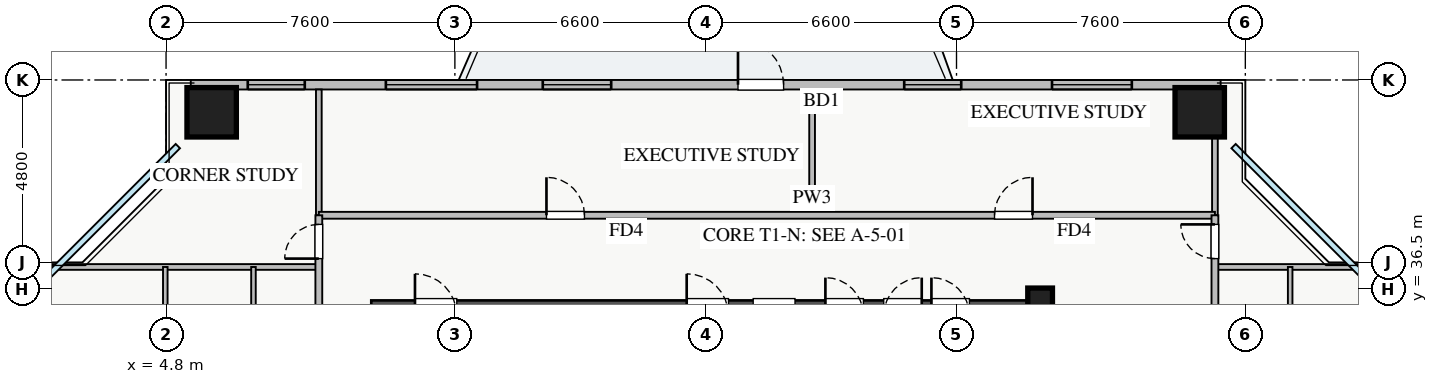
"""IFC4 building model, lengths in metres.
Left out: names, types, materials, properties, quantities, classifications, styles, units other than length and angle.
Written with IfcOpenShell. Run it as: python <this file> out.ifc"""

import sys

from ifc_helpers import new_model, si_unit, direction, frame, frame_2d, origin, origin_2d, place, context, subcontext, project, spatial, rectangle, extrude, source, transform, mapped, element, fill, save


model = new_model("IFC4")
c1 = context("Model", 3, precision=1e-05, world=origin(), true_north=direction((0.0, 1.0)))
c2 = subcontext(c1, "Body", "Model", "MODEL_VIEW")
j1 = project(units=[si_unit("LENGTHUNIT", "METRE"), si_unit("PLANEANGLEUNIT", "RADIAN")], contexts=[c1])
p1 = place(None, origin())
s1 = spatial("IfcSite", under=j1, at=p1, CompositionType="ELEMENT")
p2 = place(p1, origin())
s2 = spatial("IfcBuilding", under=s1, at=p2, CompositionType="ELEMENT")
p3 = place(p2, frame((0.0, 0.0, 53.5)))
s3 = spatial("IfcBuildingStorey", under=s2, at=p3, CompositionType="ELEMENT", Elevation=53.5)
p4 = place(p3, frame((10.2, 35.8, 0.0), z_axis=(0.0, 0.0, 1.0), x_axis=(1.0, 0.0, 0.0)))
e1 = element("IfcWall", 1, at=p4, inside=s3, PredefinedType="SHEAR", context=c2, shape_type="SweptSolid", body=[
    extrude(rectangle(XDim=17.6, YDim=0.8, at=frame_2d((8.8, 0.0))), origin(), (0.0, 0.0, 1.0), 3.25),
])
p5 = place(p4, frame((1.15, 0.0, 0.0)))
e2 = element("IfcOpeningElement", 2, at=p5, cuts=e1, PredefinedType="OPENING", context=c2, shape_type="SweptSolid", body=[
    extrude(rectangle(XDim=1.1, YDim=2.05, at=frame_2d((0.55, 1.025))), frame((0.0, 0.41, 0.0), z_axis=(0.0, -1.0, 0.0), x_axis=(1.0, 0.0, 0.0)), (0.0, 0.0, 1.0), 0.82),
])
p6 = place(p4, frame((8.3, 0.0, 0.0)))
e3 = element("IfcOpeningElement", 3, at=p6, cuts=e1, PredefinedType="OPENING", context=c2, shape_type="SweptSolid", body=[
    extrude(rectangle(XDim=1.1, YDim=2.05, at=frame_2d((0.55, 1.025))), frame((0.0, 0.41, 0.0), z_axis=(0.0, -1.0, 0.0), x_axis=(1.0, 0.0, 0.0)), (0.0, 0.0, 1.0), 0.82),
])
p7 = place(p4, frame((10.05, 0.0, 0.0)))
e4 = element("IfcOpeningElement", 4, at=p7, cuts=e1, PredefinedType="OPENING", context=c2, shape_type="SweptSolid", body=[
    extrude(rectangle(XDim=1.1, YDim=2.05, at=frame_2d((0.55, 1.025))), frame((0.0, 0.41, 0.0), z_axis=(0.0, -1.0, 0.0), x_axis=(1.0, 0.0, 0.0)), (0.0, 0.0, 1.0), 0.82),
])
p8 = place(p4, frame((14.74, 0.0, 0.0)))
e5 = element("IfcOpeningElement", 5, at=p8, cuts=e1, PredefinedType="OPENING", context=c2, shape_type="SweptSolid", body=[
    extrude(rectangle(XDim=1.0, YDim=2.05, at=frame_2d((0.5, 1.025))), frame((0.0, 0.41, 0.0), z_axis=(0.0, -1.0, 0.0), x_axis=(1.0, 0.0, 0.0)), (0.0, 0.0, 1.0), 0.82),
])
p9 = place(p4, frame((11.95, 0.0, 0.0)))
e6 = element("IfcOpeningElement", 6, at=p9, cuts=e1, PredefinedType="OPENING", context=c2, shape_type="SweptSolid", body=[
    extrude(rectangle(XDim=1.0, YDim=2.05, at=frame_2d((0.5, 1.025))), frame((0.0, 0.41, 0.0), z_axis=(0.0, -1.0, 0.0), x_axis=(1.0, 0.0, 0.0)), (0.0, 0.0, 1.0), 0.82),
])
p10 = place(p4, frame((13.485, 0.0, 0.0)))
e7 = element("IfcOpeningElement", 7, at=p10, cuts=e1, PredefinedType="OPENING", context=c2, shape_type="SweptSolid", body=[
    extrude(rectangle(XDim=1.0, YDim=2.05, at=frame_2d((0.5, 1.025))), frame((0.0, 0.41, 0.0), z_axis=(0.0, -1.0, 0.0), x_axis=(1.0, 0.0, 0.0)), (0.0, 0.0, 1.0), 0.82),
])
m1 = source(origin(), c2, "Body", "SweptSolid", [
    extrude(rectangle(XDim=0.65, YDim=0.65, at=origin_2d()), origin(), (0.0, 0.0, 1.0), 3.25),
])
p11 = place(p3, frame((27.8, 36.2, 0.0), z_axis=(0.0, 0.0, 1.0), x_axis=(1.0, 0.0, 0.0)))
e8 = element("IfcColumn", 8, at=p11, inside=s3, PredefinedType="PILASTER", context=c2, shape_type="MappedRepresentation", body=[
    mapped(m1, transform((0.0, 0.0, 0.0), x_axis=(1.0, 0.0, 0.0), y_axis=(0.0, 1.0, 0.0), z_axis=(0.0, 0.0, 1.0), scale=1.0)),
])
m2 = source(origin(), c2, "Body", "SweptSolid", [
    extrude(rectangle(XDim=1.3, YDim=1.3, at=origin_2d()), origin(), (0.0, 0.0, 1.0), 3.25),
])
for number, where, z_axis, x_axis in (
    (9, (32.0, 41.15, 0.0), (0.0, 0.0, 1.0), (1.0, 0.0, 0.0)),
    (10, (6.0, 41.15, 0.0), (0.0, 0.0, 1.0), (1.0, 0.0, 0.0)),
):
    element("IfcColumn", number, at=place(p3, frame(where, z_axis=z_axis, x_axis=x_axis)), inside=s3, PredefinedType="COLUMN", context=c2, shape_type="MappedRepresentation", body=[
        mapped(m2, transform((0.0, 0.0, 0.0), x_axis=(1.0, 0.0, 0.0), y_axis=(0.0, 1.0, 0.0), z_axis=(0.0, 0.0, 1.0), scale=1.0)),
    ])
p12 = place(p3, frame((5.45, 41.875, 0.0), z_axis=(0.0, 0.0, 1.0), x_axis=(1.0, 0.0, 0.0)))
e11 = element("IfcWall", 11, at=p12, inside=s3, PredefinedType="STANDARD", context=c2, shape_type="SweptSolid", body=[
    extrude(rectangle(XDim=27.1, YDim=0.25, at=frame_2d((13.55, 0.0))), origin(), (0.0, 0.0, 1.0), 2.61),
])
p13 = place(p12, frame((14.4, 0.0, 0.0)))
e12 = element("IfcOpeningElement", 12, at=p13, cuts=e11, PredefinedType="OPENING", context=c2, shape_type="SweptSolid", body=[
    extrude(rectangle(XDim=1.2, YDim=2.1, at=frame_2d((0.6, 1.05))), frame((0.0, 0.135, 0.0), z_axis=(0.0, -1.0, 0.0), x_axis=(1.0, 0.0, 0.0)), (0.0, 0.0, 1.0), 0.27),
])
p14 = place(p12, frame((1.5, 0.0, 0.9)))
e13 = element("IfcOpeningElement", 13, at=p14, cuts=e11, PredefinedType="OPENING", context=c2, shape_type="SweptSolid", body=[
    extrude(rectangle(XDim=1.5, YDim=1.5, at=frame_2d((0.75, 0.75))), frame((0.0, 0.135, 0.0), z_axis=(0.0, -1.0, 0.0), x_axis=(1.0, 0.0, 0.0)), (0.0, 0.0, 1.0), 0.27),
])
p15 = place(p12, frame((9.263, 0.0, 0.9)))
e14 = element("IfcOpeningElement", 14, at=p15, cuts=e11, PredefinedType="OPENING", context=c2, shape_type="SweptSolid", body=[
    extrude(rectangle(XDim=1.8, YDim=1.45, at=frame_2d((0.9, 0.725))), frame((0.0, 0.135, 0.0), z_axis=(0.0, -1.0, 0.0), x_axis=(1.0, 0.0, 0.0)), (0.0, 0.0, 1.0), 0.27),
])
p16 = place(p12, frame((18.774, 0.0, 0.9)))
e15 = element("IfcOpeningElement", 15, at=p16, cuts=e11, PredefinedType="OPENING", context=c2, shape_type="SweptSolid", body=[
    extrude(rectangle(XDim=1.5, YDim=1.5, at=frame_2d((0.75, 0.75))), frame((0.0, 0.135, 0.0), z_axis=(0.0, -1.0, 0.0), x_axis=(1.0, 0.0, 0.0)), (0.0, 0.0, 1.0), 0.27),
])
p17 = place(p12, frame((22.663, 0.0, 0.9)))
e16 = element("IfcOpeningElement", 16, at=p17, cuts=e11, PredefinedType="OPENING", context=c2, shape_type="SweptSolid", body=[
    extrude(rectangle(XDim=2.1, YDim=1.48, at=frame_2d((1.05, 0.74))), frame((0.0, 0.135, 0.0), z_axis=(0.0, -1.0, 0.0), x_axis=(1.0, 0.0, 0.0)), (0.0, 0.0, 1.0), 0.27),
])
p18 = place(p12, frame((5.134, 0.0, 0.9)))
e17 = element("IfcOpeningElement", 17, at=p18, cuts=e11, PredefinedType="OPENING", context=c2, shape_type="SweptSolid", body=[
    extrude(rectangle(XDim=2.4, YDim=1.5, at=frame_2d((1.2, 0.75))), frame((0.0, 0.135, 0.0), z_axis=(0.0, -1.0, 0.0), x_axis=(1.0, 0.0, 0.0)), (0.0, 0.0, 1.0), 0.27),
])
for number, where, z_axis, x_axis in (
    (18, (21.8, 38.44, 0.0), (0.0, 0.0, 1.0), (0.0, 1.0, 0.0)),
    (19, (8.82, 38.44, 0.0), (0.0, 0.0, 1.0), (0.0, 1.0, 0.0)),
    (20, (32.4, 38.44, 0.0), (0.0, 0.0, 1.0), (0.0, 1.0, 0.0)),
):
    element("IfcWall", number, at=place(p3, frame(where, z_axis=z_axis, x_axis=x_axis)), inside=s3, PredefinedType="PARTITIONING", context=c2, shape_type="SweptSolid", body=[
        extrude(rectangle(XDim=3.31, YDim=0.15, at=frame_2d((1.655, 0.0))), origin(), (0.0, 0.0, 1.0), 3.07),
    ])
p19 = place(p3, frame((8.82, 38.44, 0.0), z_axis=(0.0, 0.0, 1.0), x_axis=(1.0, 0.0, 0.0)))
e21 = element("IfcWall", 21, at=p19, inside=s3, PredefinedType="PARTITIONING", context=c2, shape_type="SweptSolid", body=[
    extrude(rectangle(XDim=23.58, YDim=0.18, at=frame_2d((11.79, 0.0))), origin(), (0.0, 0.0, 1.0), 3.07),
])
p20 = place(p19, frame((5.99, 0.0, 0.0)))
e22 = element("IfcOpeningElement", 22, at=p20, cuts=e21, PredefinedType="OPENING", context=c2, shape_type="SweptSolid", body=[
    extrude(rectangle(XDim=1.0, YDim=2.05, at=frame_2d((0.5, 1.025))), frame((0.0, 0.1, 0.0), z_axis=(0.0, -1.0, 0.0), x_axis=(1.0, 0.0, 0.0)), (0.0, 0.0, 1.0), 0.2),
])
p21 = place(p19, frame((17.78, 0.0, 0.0)))
e23 = element("IfcOpeningElement", 23, at=p21, cuts=e21, PredefinedType="OPENING", context=c2, shape_type="SweptSolid", body=[
    extrude(rectangle(XDim=1.0, YDim=2.05, at=frame_2d((0.5, 1.025))), frame((0.0, 0.1, 0.0), z_axis=(0.0, -1.0, 0.0), x_axis=(1.0, 0.0, 0.0)), (0.0, 0.0, 1.0), 0.2),
])
p22 = place(p3, frame((0.25, 37.08, 0.0), z_axis=(0.0, 0.0, 1.0), x_axis=(1.0, 0.0, 0.0)))
e24 = element("IfcWall", 24, at=p22, inside=s3, PredefinedType="PARTITIONING", context=c2, shape_type="SweptSolid", body=[
    extrude(rectangle(XDim=8.57, YDim=0.15, at=frame_2d((4.285, 0.0))), origin(), (0.0, 0.0, 1.0), 3.07),
])
for number, where, z_axis, x_axis in (
    (25, (4.78, 32.14, 0.0), (0.0, 0.0, 1.0), (0.0, 1.0, 0.0)),
    (26, (7.1, 32.14, 0.0), (0.0, 0.0, 1.0), (0.0, 1.0, 0.0)),
):
    element("IfcWall", number, at=place(p3, frame(where, z_axis=z_axis, x_axis=x_axis)), inside=s3, PredefinedType="PLUMBINGWALL", context=c2, shape_type="SweptSolid", body=[
        extrude(rectangle(XDim=4.94, YDim=0.12, at=frame_2d((2.47, 0.0))), origin(), (0.0, 0.0, 1.0), 3.07),
    ])
p23 = place(p3, frame((8.82, 7.21, 0.0), z_axis=(0.0, 0.0, 1.0), x_axis=(0.0, 1.0, 0.0)))
e27 = element("IfcWall", 27, at=p23, inside=s3, PredefinedType="PARTITIONING", context=c2, shape_type="SweptSolid", body=[
    extrude(rectangle(XDim=31.23, YDim=0.18, at=frame_2d((15.615, 0.0))), origin(), (0.0, 0.0, 1.0), 3.07),
])
p24 = place(p23, frame((30.09, 0.0, 0.0)))
e28 = element("IfcOpeningElement", 28, at=p24, cuts=e27, PredefinedType="OPENING", context=c2, shape_type="SweptSolid", body=[
    extrude(rectangle(XDim=0.9, YDim=2.05, at=frame_2d((0.45, 1.025))), frame((0.0, 0.1, 0.0), z_axis=(0.0, -1.0, 0.0), x_axis=(1.0, 0.0, 0.0)), (0.0, 0.0, 1.0), 0.2),
])
p25 = place(p23, frame((0.24, 0.0, 0.0)))
e29 = element("IfcOpeningElement", 29, at=p25, cuts=e27, PredefinedType="OPENING", context=c2, shape_type="SweptSolid", body=[
    extrude(rectangle(XDim=0.9, YDim=2.05, at=frame_2d((0.45, 1.025))), frame((0.0, 0.1, 0.0), z_axis=(0.0, -1.0, 0.0), x_axis=(1.0, 0.0, 0.0)), (0.0, 0.0, 1.0), 0.2),
])
p26 = place(p23, frame((2.95, 0.0, 0.0)))
e30 = element("IfcOpeningElement", 30, at=p26, cuts=e27, PredefinedType="OPENING", context=c2, shape_type="SweptSolid", body=[
    extrude(rectangle(XDim=1.0, YDim=2.05, at=frame_2d((0.5, 1.025))), frame((0.0, 0.1, 0.0), z_axis=(0.0, -1.0, 0.0), x_axis=(1.0, 0.0, 0.0)), (0.0, 0.0, 1.0), 0.2),
])
p27 = place(p23, frame((15.115, 0.0, 0.0)))
e31 = element("IfcOpeningElement", 31, at=p27, cuts=e27, PredefinedType="OPENING", context=c2, shape_type="SweptSolid", body=[
    extrude(rectangle(XDim=1.0, YDim=2.05, at=frame_2d((0.5, 1.025))), frame((0.0, 0.1, 0.0), z_axis=(0.0, -1.0, 0.0), x_axis=(1.0, 0.0, 0.0)), (0.0, 0.0, 1.0), 0.2),
])
p28 = place(p23, frame((21.96, 0.0, 0.0)))
e32 = element("IfcOpeningElement", 32, at=p28, cuts=e27, PredefinedType="OPENING", context=c2, shape_type="SweptSolid", body=[
    extrude(rectangle(XDim=1.0, YDim=2.05, at=frame_2d((0.5, 1.025))), frame((0.0, 0.1, 0.0), z_axis=(0.0, -1.0, 0.0), x_axis=(1.0, 0.0, 0.0)), (0.0, 0.0, 1.0), 0.2),
])
p29 = place(p3, frame((32.4, 37.08, 0.0), z_axis=(0.0, 0.0, 1.0), x_axis=(1.0, 0.0, 0.0)))
e33 = element("IfcWall", 33, at=p29, inside=s3, PredefinedType="PARTITIONING", context=c2, shape_type="SweptSolid", body=[
    extrude(rectangle(XDim=5.35, YDim=0.15, at=frame_2d((2.675, 0.0))), origin(), (0.0, 0.0, 1.0), 3.07),
])
p30 = place(p3, frame((34.38, 32.87, 0.0), z_axis=(0.0, 0.0, 1.0), x_axis=(0.0, 1.0, 0.0)))
e34 = element("IfcWall", 34, at=p30, inside=s3, PredefinedType="PLUMBINGWALL", context=c2, shape_type="SweptSolid", body=[
    extrude(rectangle(XDim=4.21, YDim=0.12, at=frame_2d((2.105, 0.0))), origin(), (0.0, 0.0, 1.0), 3.07),
])
p31 = place(p3, frame((32.4, 7.21, 0.0), z_axis=(0.0, 0.0, 1.0), x_axis=(0.0, 1.0, 0.0)))
e35 = element("IfcWall", 35, at=p31, inside=s3, PredefinedType="PARTITIONING", context=c2, shape_type="SweptSolid", body=[
    extrude(rectangle(XDim=31.23, YDim=0.18, at=frame_2d((15.615, 0.0))), origin(), (0.0, 0.0, 1.0), 2.771),
])
p32 = place(p31, frame((30.09, 0.0, 0.0)))
e36 = element("IfcOpeningElement", 36, at=p32, cuts=e35, PredefinedType="OPENING", context=c2, shape_type="SweptSolid", body=[
    extrude(rectangle(XDim=0.9, YDim=2.05, at=frame_2d((0.45, 1.025))), frame((0.0, 0.1, 0.0), z_axis=(0.0, -1.0, 0.0), x_axis=(1.0, 0.0, 0.0)), (0.0, 0.0, 1.0), 0.2),
])
p33 = place(p31, frame((0.415, 0.0, 0.0)))
e37 = element("IfcOpeningElement", 37, at=p33, cuts=e35, PredefinedType="OPENING", context=c2, shape_type="SweptSolid", body=[
    extrude(rectangle(XDim=0.9, YDim=2.05, at=frame_2d((0.45, 1.025))), frame((0.0, 0.1, 0.0), z_axis=(0.0, -1.0, 0.0), x_axis=(1.0, 0.0, 0.0)), (0.0, 0.0, 1.0), 0.2),
])
p34 = place(p31, frame((3.585, 0.0, 0.0)))
e38 = element("IfcOpeningElement", 38, at=p34, cuts=e35, PredefinedType="OPENING", context=c2, shape_type="SweptSolid", body=[
    extrude(rectangle(XDim=1.0, YDim=2.05, at=frame_2d((0.5, 1.025))), frame((0.0, 0.1, 0.0), z_axis=(0.0, -1.0, 0.0), x_axis=(1.0, 0.0, 0.0)), (0.0, 0.0, 1.0), 0.2),
])
p35 = place(p31, frame((12.86, 0.0, 0.0)))
e39 = element("IfcOpeningElement", 39, at=p35, cuts=e35, PredefinedType="OPENING", context=c2, shape_type="SweptSolid", body=[
    extrude(rectangle(XDim=1.0, YDim=2.05, at=frame_2d((0.5, 1.025))), frame((0.0, 0.1, 0.0), z_axis=(0.0, -1.0, 0.0), x_axis=(1.0, 0.0, 0.0)), (0.0, 0.0, 1.0), 0.2),
])
p36 = place(p31, frame((22.5, 0.0, 0.0)))
e40 = element("IfcOpeningElement", 40, at=p36, cuts=e35, PredefinedType="OPENING", context=c2, shape_type="SweptSolid", body=[
    extrude(rectangle(XDim=1.0, YDim=2.05, at=frame_2d((0.5, 1.025))), frame((0.0, 0.1, 0.0), z_axis=(0.0, -1.0, 0.0), x_axis=(1.0, 0.0, 0.0)), (0.0, 0.0, 1.0), 0.2),
])
m3 = source(origin(), c2, "Body", "SweptSolid", [
    extrude(rectangle(XDim=1.2, YDim=2.1, at=frame_2d((0.6, 1.05))), frame((0.0, 0.025, 0.0), z_axis=(0.0, -1.0, 0.0), x_axis=(1.0, 0.0, 0.0)), (0.0, 0.0, 1.0), 0.05),
])
p37 = place(p13, origin())
e41 = element("IfcDoor", 41, at=p37, inside=s3, OperationType="SINGLE_SWING_LEFT", PredefinedType="DOOR", context=c2, shape_type="MappedRepresentation", body=[
    mapped(m3, transform((0.0, 0.0, 0.0), x_axis=(1.0, 0.0, 0.0), y_axis=(0.0, 1.0, 0.0), z_axis=(0.0, 0.0, 1.0), scale=1.0)),
])
fill(e12, e41)
m4 = source(origin(), c2, "Body", "SweptSolid", [
    extrude(rectangle(XDim=1.5, YDim=1.5, at=frame_2d((0.75, 0.75))), frame((0.0, 0.03, 0.0), z_axis=(0.0, -1.0, 0.0), x_axis=(1.0, 0.0, 0.0)), (0.0, 0.0, 1.0), 0.06),
])
p38 = place(p14, origin())
e42 = element("IfcWindow", 42, at=p38, inside=s3, PartitioningType="TRIPLE_PANEL_VERTICAL", PredefinedType="WINDOW", context=c2, shape_type="MappedRepresentation", body=[
    mapped(m4, transform((0.0, 0.0, 0.0), x_axis=(1.0, 0.0, 0.0), y_axis=(0.0, 1.0, 0.0), z_axis=(0.0, 0.0, 1.0), scale=1.0)),
])
fill(e13, e42)
m5 = source(origin(), c2, "Body", "SweptSolid", [
    extrude(rectangle(XDim=1.8, YDim=1.45, at=frame_2d((0.9, 0.725))), frame((0.0, 0.03, 0.0), z_axis=(0.0, -1.0, 0.0), x_axis=(1.0, 0.0, 0.0)), (0.0, 0.0, 1.0), 0.06),
])
p39 = place(p15, origin())
e43 = element("IfcWindow", 43, at=p39, inside=s3, PartitioningType="DOUBLE_PANEL_VERTICAL", PredefinedType="WINDOW", context=c2, shape_type="MappedRepresentation", body=[
    mapped(m5, transform((0.0, 0.0, 0.0), x_axis=(1.0, 0.0, 0.0), y_axis=(0.0, 1.0, 0.0), z_axis=(0.0, 0.0, 1.0), scale=1.0)),
])
fill(e14, e43)
p40 = place(p16, origin())
e44 = element("IfcWindow", 44, at=p40, inside=s3, PartitioningType="DOUBLE_PANEL_VERTICAL", PredefinedType="WINDOW", context=c2, shape_type="MappedRepresentation", body=[
    mapped(m4, transform((0.0, 0.0, 0.0), x_axis=(1.0, 0.0, 0.0), y_axis=(0.0, 1.0, 0.0), z_axis=(0.0, 0.0, 1.0), scale=1.0)),
])
fill(e15, e44)
m6 = source(origin(), c2, "Body", "SweptSolid", [
    extrude(rectangle(XDim=2.1, YDim=1.48, at=frame_2d((1.05, 0.74))), frame((0.0, 0.03, 0.0), z_axis=(0.0, -1.0, 0.0), x_axis=(1.0, 0.0, 0.0)), (0.0, 0.0, 1.0), 0.06),
])
p41 = place(p17, origin())
e45 = element("IfcWindow", 45, at=p41, inside=s3, PartitioningType="TRIPLE_PANEL_VERTICAL", PredefinedType="WINDOW", context=c2, shape_type="MappedRepresentation", body=[
    mapped(m6, transform((0.0, 0.0, 0.0), x_axis=(1.0, 0.0, 0.0), y_axis=(0.0, 1.0, 0.0), z_axis=(0.0, 0.0, 1.0), scale=1.0)),
])
fill(e16, e45)
m7 = source(origin(), c2, "Body", "SweptSolid", [
    extrude(rectangle(XDim=1.0, YDim=2.05, at=frame_2d((0.5, 1.025))), frame((0.0, 0.025, 0.0), z_axis=(0.0, -1.0, 0.0), x_axis=(1.0, 0.0, 0.0)), (0.0, 0.0, 1.0), 0.05),
])
p42 = place(p20, origin())
e46 = element("IfcDoor", 46, at=p42, inside=s3, OperationType="SINGLE_SWING_LEFT", PredefinedType="DOOR", context=c2, shape_type="MappedRepresentation", body=[
    mapped(m7, transform((0.0, 0.0, 0.0), x_axis=(1.0, 0.0, 0.0), y_axis=(0.0, 1.0, 0.0), z_axis=(0.0, 0.0, 1.0), scale=1.0)),
])
fill(e22, e46)
p43 = place(p21, origin())
e47 = element("IfcDoor", 47, at=p43, inside=s3, OperationType="SINGLE_SWING_RIGHT", PredefinedType="DOOR", context=c2, shape_type="MappedRepresentation", body=[
    mapped(m7, transform((0.0, 0.0, 0.0), x_axis=(1.0, 0.0, 0.0), y_axis=(0.0, 1.0, 0.0), z_axis=(0.0, 0.0, 1.0), scale=1.0)),
])
fill(e23, e47)
m8 = source(origin(), c2, "Body", "SweptSolid", [
    extrude(rectangle(XDim=0.9, YDim=2.05, at=frame_2d((0.45, 1.025))), frame((0.0, 0.025, 0.0), z_axis=(0.0, -1.0, 0.0), x_axis=(1.0, 0.0, 0.0)), (0.0, 0.0, 1.0), 0.05),
])
p44 = place(p24, origin())
e48 = element("IfcDoor", 48, at=p44, inside=s3, OperationType="SINGLE_SWING_LEFT", PredefinedType="DOOR", context=c2, shape_type="MappedRepresentation", body=[
    mapped(m8, transform((0.0, 0.0, 0.0), x_axis=(1.0, 0.0, 0.0), y_axis=(0.0, 1.0, 0.0), z_axis=(0.0, 0.0, 1.0), scale=1.0)),
])
fill(e28, e48)
p45 = place(p32, origin())
e49 = element("IfcDoor", 49, at=p45, inside=s3, OperationType="SINGLE_SWING_RIGHT", PredefinedType="DOOR", context=c2, shape_type="MappedRepresentation", body=[
    mapped(m8, transform((0.0, 0.0, 0.0), x_axis=(1.0, 0.0, 0.0), y_axis=(0.0, 1.0, 0.0), z_axis=(0.0, 0.0, 1.0), scale=1.0)),
])
fill(e36, e49)
m9 = source(origin(), c2, "Body", "SweptSolid", [
    extrude(rectangle(XDim=2.4, YDim=1.5, at=frame_2d((1.2, 0.75))), frame((0.0, 0.03, 0.0), z_axis=(0.0, -1.0, 0.0), x_axis=(1.0, 0.0, 0.0)), (0.0, 0.0, 1.0), 0.06),
])
p46 = place(p18, origin())
e50 = element("IfcWindow", 50, at=p46, inside=s3, PartitioningType="TRIPLE_PANEL_VERTICAL", PredefinedType="WINDOW", context=c2, shape_type="MappedRepresentation", body=[
    mapped(m9, transform((0.0, 0.0, 0.0), x_axis=(1.0, 0.0, 0.0), y_axis=(0.0, 1.0, 0.0), z_axis=(0.0, 0.0, 1.0), scale=1.0)),
])
fill(e17, e50)
save(model, sys.argv[1])
